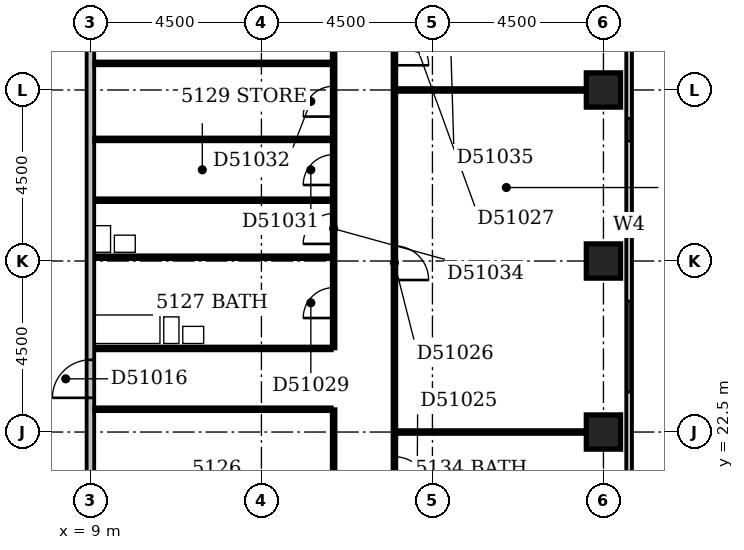
"""IFC4 building model, lengths in metres.
Left out: names, types, materials, properties, quantities, classifications, styles, units other than length and angle.
Written with IfcOpenShell. Run it as: python <this file> out.ifc"""

import sys

from ifc_helpers import new_model, si_unit, direction, frame, frame_2d, origin, origin_2d, place, context, subcontext, project, spatial, rectangle, extrude, element, fill, save


model = new_model("IFC4")
c1 = context("Model", 3, precision=1e-05, world=origin(), true_north=direction((0.0, 1.0)))
c2 = subcontext(c1, "Body", "Model", "MODEL_VIEW")
j1 = project(units=[si_unit("LENGTHUNIT", "METRE"), si_unit("PLANEANGLEUNIT", "RADIAN")], contexts=[c1])
p1 = place(None, origin())
s1 = spatial("IfcSite", under=j1, at=p1, CompositionType="ELEMENT")
p2 = place(p1, origin())
s2 = spatial("IfcBuilding", under=s1, at=p2, CompositionType="ELEMENT")
p3 = place(p2, frame((0.0, 0.0, 200.6)))
s3 = spatial("IfcBuildingStorey", under=s2, at=p3, CompositionType="ELEMENT", Elevation=200.6)
for number, where, z_axis, x_axis in (
    (1, (22.5, 22.5, -0.3), (0.0, 0.0, 1.0), (1.0, 0.0, 0.0)),
    (2, (22.5, 27.0, -0.3), (0.0, 0.0, 1.0), (1.0, 0.0, 0.0)),
    (3, (22.5, 31.5, -0.3), (0.0, 0.0, 1.0), (1.0, 0.0, 0.0)),
):
    element("IfcColumn", number, at=place(p3, frame(where, z_axis=z_axis, x_axis=x_axis)), inside=s3, PredefinedType="COLUMN", context=c2, shape_type="SweptSolid", body=[
        extrude(rectangle(XDim=0.9, YDim=0.9, at=origin_2d()), origin(), (0.0, 0.0, 1.0), 3.6),
    ])
p4 = place(p3, frame((23.175, 17.4, 0.0), z_axis=(0.0, 0.0, 1.0), x_axis=(0.0, 1.0, 0.0)))
e4 = element("IfcWall", 4, at=p4, inside=s3, PredefinedType="STANDARD", context=c2, shape_type="SweptSolid", body=[
    extrude(rectangle(XDim=17.85, YDim=0.15, at=frame_2d((8.925, 0.0))), origin(), (0.0, 0.0, 1.0), 2.7),
])
p5 = place(p4, frame((1.65, 0.0, 0.6)))
e5 = element("IfcOpeningElement", 5, at=p5, cuts=e4, PredefinedType="OPENING", context=c2, shape_type="SweptSolid", body=[
    extrude(rectangle(XDim=2.4, YDim=1.8, at=frame_2d((1.2, 0.9))), frame((0.0, 0.087, 0.0), z_axis=(0.0, -1.0, 0.0), x_axis=(1.0, 0.0, 0.0)), (0.0, 0.0, 1.0), 0.174),
])
p6 = place(p4, frame((6.15, 0.0, 0.6)))
e6 = element("IfcOpeningElement", 6, at=p6, cuts=e4, PredefinedType="OPENING", context=c2, shape_type="SweptSolid", body=[
    extrude(rectangle(XDim=2.4, YDim=1.8, at=frame_2d((1.2, 0.9))), frame((0.0, 0.087, 0.0), z_axis=(0.0, -1.0, 0.0), x_axis=(1.0, 0.0, 0.0)), (0.0, 0.0, 1.0), 0.174),
])
p7 = place(p4, frame((10.252, 0.0, 0.6)))
e7 = element("IfcOpeningElement", 7, at=p7, cuts=e4, PredefinedType="OPENING", context=c2, shape_type="SweptSolid", body=[
    extrude(rectangle(XDim=0.6, YDim=1.8, at=frame_2d((0.3, 0.9))), frame((0.0, 0.087, 0.0), z_axis=(0.0, -1.0, 0.0), x_axis=(1.0, 0.0, 0.0)), (0.0, 0.0, 1.0), 0.174),
])
p8 = place(p4, frame((12.756, 0.0, 0.6)))
e8 = element("IfcOpeningElement", 8, at=p8, cuts=e4, PredefinedType="OPENING", context=c2, shape_type="SweptSolid", body=[
    extrude(rectangle(XDim=0.6, YDim=1.8, at=frame_2d((0.3, 0.9))), frame((0.0, 0.087, 0.0), z_axis=(0.0, -1.0, 0.0), x_axis=(1.0, 0.0, 0.0)), (0.0, 0.0, 1.0), 0.174),
])
p9 = place(p4, frame((15.15, 0.0, 0.6)))
e9 = element("IfcOpeningElement", 9, at=p9, cuts=e4, PredefinedType="OPENING", context=c2, shape_type="SweptSolid", body=[
    extrude(rectangle(XDim=2.4, YDim=1.8, at=frame_2d((1.2, 0.9))), frame((0.0, 0.087, 0.0), z_axis=(0.0, -1.0, 0.0), x_axis=(1.0, 0.0, 0.0)), (0.0, 0.0, 1.0), 0.174),
])
p10 = place(p3, frame((9.0, 5.0, 0.0), z_axis=(0.0, 0.0, 1.0), x_axis=(0.0, 1.0, 0.0)))
e10 = element("IfcWall", 10, at=p10, inside=s3, PredefinedType="PARTITIONING", context=c2, shape_type="SweptSolid", body=[
    extrude(rectangle(XDim=31.0, YDim=0.2, at=frame_2d((15.5, 0.0))), origin(), (0.0, 0.0, 1.0), 3.3),
])
p11 = place(p10, frame((18.4, 0.0, 0.0)))
e11 = element("IfcOpeningElement", 11, at=p11, cuts=e10, PredefinedType="OPENING", context=c2, shape_type="SweptSolid", body=[
    extrude(rectangle(XDim=1.0, YDim=2.1, at=frame_2d((0.5, 1.05))), frame((0.0, 0.112, 0.0), z_axis=(0.0, -1.0, 0.0), x_axis=(1.0, 0.0, 0.0)), (0.0, 0.0, 1.0), 0.224),
])
p12 = place(p10, frame((11.7, 0.0, 0.0)))
e12 = element("IfcOpeningElement", 12, at=p12, cuts=e10, PredefinedType="OPENING", context=c2, shape_type="SweptSolid", body=[
    extrude(rectangle(XDim=1.0, YDim=2.1, at=frame_2d((0.5, 1.05))), frame((0.0, 0.112, 0.0), z_axis=(0.0, -1.0, 0.0), x_axis=(1.0, 0.0, 0.0)), (0.0, 0.0, 1.0), 0.224),
])
p13 = place(p10, frame((1.5, 0.0, 0.0)))
e13 = element("IfcOpeningElement", 13, at=p13, cuts=e10, PredefinedType="OPENING", context=c2, shape_type="SweptSolid", body=[
    extrude(rectangle(XDim=0.9, YDim=2.1, at=frame_2d((0.45, 1.05))), frame((0.0, 0.112, 0.0), z_axis=(0.0, -1.0, 0.0), x_axis=(1.0, 0.0, 0.0)), (0.0, 0.0, 1.0), 0.224),
])
p14 = place(p3, frame((15.4, 18.1, 0.0), z_axis=(0.0, 0.0, 1.0), x_axis=(0.0, 1.0, 0.0)))
e14 = element("IfcWall", 14, at=p14, inside=s3, PredefinedType="PARTITIONING", context=c2, shape_type="SweptSolid", body=[
    extrude(rectangle(XDim=5.0, YDim=0.1, at=frame_2d((2.5, 0.0))), origin(), (0.0, 0.0, 1.0), 3.3),
])
p15 = place(p14, frame((2.0, 0.0, 0.0)))
e15 = element("IfcOpeningElement", 15, at=p15, cuts=e14, PredefinedType="OPENING", context=c2, shape_type="SweptSolid", body=[
    extrude(rectangle(XDim=0.9, YDim=2.1, at=frame_2d((0.45, 1.05))), frame((0.0, 0.062, 0.0), z_axis=(0.0, -1.0, 0.0), x_axis=(1.0, 0.0, 0.0)), (0.0, 0.0, 1.0), 0.124),
])
p16 = place(p3, frame((17.0, 18.1, 0.0), z_axis=(0.0, 0.0, 1.0), x_axis=(0.0, 1.0, 0.0)))
e16 = element("IfcWall", 16, at=p16, inside=s3, PredefinedType="PARTITIONING", context=c2, shape_type="SweptSolid", body=[
    extrude(rectangle(XDim=17.8, YDim=0.1, at=frame_2d((8.9, 0.0))), origin(), (0.0, 0.0, 1.0), 3.3),
])
p17 = place(p16, frame((2.85, 0.0, 0.0)))
e17 = element("IfcOpeningElement", 17, at=p17, cuts=e16, PredefinedType="OPENING", context=c2, shape_type="SweptSolid", body=[
    extrude(rectangle(XDim=0.9, YDim=2.1, at=frame_2d((0.45, 1.05))), frame((0.0, 0.062, 0.0), z_axis=(0.0, -1.0, 0.0), x_axis=(1.0, 0.0, 0.0)), (0.0, 0.0, 1.0), 0.124),
])
p18 = place(p16, frame((8.4, 0.0, 0.0)))
e18 = element("IfcOpeningElement", 18, at=p18, cuts=e16, PredefinedType="OPENING", context=c2, shape_type="SweptSolid", body=[
    extrude(rectangle(XDim=0.9, YDim=2.1, at=frame_2d((0.45, 1.05))), frame((0.0, 0.062, 0.0), z_axis=(0.0, -1.0, 0.0), x_axis=(1.0, 0.0, 0.0)), (0.0, 0.0, 1.0), 0.124),
])
p19 = place(p16, frame((14.05, 0.0, 0.0)))
e19 = element("IfcOpeningElement", 19, at=p19, cuts=e16, PredefinedType="OPENING", context=c2, shape_type="SweptSolid", body=[
    extrude(rectangle(XDim=0.9, YDim=2.1, at=frame_2d((0.45, 1.05))), frame((0.0, 0.062, 0.0), z_axis=(0.0, -1.0, 0.0), x_axis=(1.0, 0.0, 0.0)), (0.0, 0.0, 1.0), 0.124),
])
p20 = place(p3, frame((17.05, 22.5, 0.0), z_axis=(0.0, 0.0, 1.0), x_axis=(1.0, 0.0, 0.0)))
e20 = element("IfcWall", 20, at=p20, inside=s3, PredefinedType="PARTITIONING", context=c2, shape_type="SweptSolid", body=[
    extrude(rectangle(XDim=5.0, YDim=0.1, at=frame_2d((2.5, 0.0))), origin(), (0.0, 0.0, 1.0), 3.3),
])
p21 = place(p3, frame((9.1, 23.1, 0.0), z_axis=(0.0, 0.0, 1.0), x_axis=(1.0, 0.0, 0.0)))
e21 = element("IfcWall", 21, at=p21, inside=s3, PredefinedType="PARTITIONING", context=c2, shape_type="SweptSolid", body=[
    extrude(rectangle(XDim=6.25, YDim=0.1, at=frame_2d((3.125, 0.0))), origin(), (0.0, 0.0, 1.0), 3.3),
])
p22 = place(p3, frame((9.1, 24.7, 0.0), z_axis=(0.0, 0.0, 1.0), x_axis=(1.0, 0.0, 0.0)))
e22 = element("IfcWall", 22, at=p22, inside=s3, PredefinedType="PLUMBINGWALL", context=c2, shape_type="SweptSolid", body=[
    extrude(rectangle(XDim=6.25, YDim=0.1, at=frame_2d((3.125, 0.0))), origin(), (0.0, 0.0, 1.0), 3.3),
])
p23 = place(p3, frame((15.4, 24.7, 0.0), z_axis=(0.0, 0.0, 1.0), x_axis=(0.0, 1.0, 0.0)))
e23 = element("IfcWall", 23, at=p23, inside=s3, PredefinedType="PARTITIONING", context=c2, shape_type="SweptSolid", body=[
    extrude(rectangle(XDim=11.2, YDim=0.1, at=frame_2d((5.6, 0.0))), origin(), (0.0, 0.0, 1.0), 3.3),
])
p24 = place(p23, frame((0.8, 0.0, 0.0)))
e24 = element("IfcOpeningElement", 24, at=p24, cuts=e23, PredefinedType="OPENING", context=c2, shape_type="SweptSolid", body=[
    extrude(rectangle(XDim=0.8, YDim=2.1, at=frame_2d((0.4, 1.05))), frame((0.0, 0.062, 0.0), z_axis=(0.0, -1.0, 0.0), x_axis=(1.0, 0.0, 0.0)), (0.0, 0.0, 1.0), 0.124),
])
p25 = place(p23, frame((8.1, 0.0, 0.0)))
e25 = element("IfcOpeningElement", 25, at=p25, cuts=e23, PredefinedType="OPENING", context=c2, shape_type="SweptSolid", body=[
    extrude(rectangle(XDim=0.8, YDim=2.1, at=frame_2d((0.4, 1.05))), frame((0.0, 0.062, 0.0), z_axis=(0.0, -1.0, 0.0), x_axis=(1.0, 0.0, 0.0)), (0.0, 0.0, 1.0), 0.124),
])
p26 = place(p23, frame((4.3, 0.0, 0.0)))
e26 = element("IfcOpeningElement", 26, at=p26, cuts=e23, PredefinedType="OPENING", context=c2, shape_type="SweptSolid", body=[
    extrude(rectangle(XDim=0.8, YDim=2.1, at=frame_2d((0.4, 1.05))), frame((0.0, 0.062, 0.0), z_axis=(0.0, -1.0, 0.0), x_axis=(1.0, 0.0, 0.0)), (0.0, 0.0, 1.0), 0.124),
])
p27 = place(p23, frame((6.1, 0.0, 0.0)))
e27 = element("IfcOpeningElement", 27, at=p27, cuts=e23, PredefinedType="OPENING", context=c2, shape_type="SweptSolid", body=[
    extrude(rectangle(XDim=0.8, YDim=2.1, at=frame_2d((0.4, 1.05))), frame((0.0, 0.062, 0.0), z_axis=(0.0, -1.0, 0.0), x_axis=(1.0, 0.0, 0.0)), (0.0, 0.0, 1.0), 0.124),
])
p28 = place(p23, frame((10.0, 0.0, 0.0)))
e28 = element("IfcOpeningElement", 28, at=p28, cuts=e23, PredefinedType="OPENING", context=c2, shape_type="SweptSolid", body=[
    extrude(rectangle(XDim=0.8, YDim=2.1, at=frame_2d((0.4, 1.05))), frame((0.0, 0.062, 0.0), z_axis=(0.0, -1.0, 0.0), x_axis=(1.0, 0.0, 0.0)), (0.0, 0.0, 1.0), 0.124),
])
p29 = place(p23, frame((2.75, 0.0, 0.0)))
e29 = element("IfcOpeningElement", 29, at=p29, cuts=e23, PredefinedType="OPENING", context=c2, shape_type="SweptSolid", body=[
    extrude(rectangle(XDim=0.8, YDim=2.1, at=frame_2d((0.4, 1.05))), frame((0.0, 0.062, 0.0), z_axis=(0.0, -1.0, 0.0), x_axis=(1.0, 0.0, 0.0)), (0.0, 0.0, 1.0), 0.124),
])
p30 = place(p3, frame((9.1, 27.1, 0.0), z_axis=(0.0, 0.0, 1.0), x_axis=(1.0, 0.0, 0.0)))
e30 = element("IfcWall", 30, at=p30, inside=s3, PredefinedType="PLUMBINGWALL", context=c2, shape_type="SweptSolid", body=[
    extrude(rectangle(XDim=6.25, YDim=0.1, at=frame_2d((3.125, 0.0))), origin(), (0.0, 0.0, 1.0), 2.7),
])
p31 = place(p3, frame((9.1, 28.6, 0.0), z_axis=(0.0, 0.0, 1.0), x_axis=(1.0, 0.0, 0.0)))
e31 = element("IfcWall", 31, at=p31, inside=s3, PredefinedType="PLUMBINGWALL", context=c2, shape_type="SweptSolid", body=[
    extrude(rectangle(XDim=6.25, YDim=0.1, at=frame_2d((3.125, 0.0))), origin(), (0.0, 0.0, 1.0), 3.3),
])
p32 = place(p3, frame((9.1, 30.2, 0.0), z_axis=(0.0, 0.0, 1.0), x_axis=(1.0, 0.0, 0.0)))
e32 = element("IfcWall", 32, at=p32, inside=s3, PredefinedType="PARTITIONING", context=c2, shape_type="SweptSolid", body=[
    extrude(rectangle(XDim=6.25, YDim=0.1, at=frame_2d((3.125, 0.0))), origin(), (0.0, 0.0, 1.0), 3.3),
])
p33 = place(p3, frame((17.05, 31.5, 0.0), z_axis=(0.0, 0.0, 1.0), x_axis=(1.0, 0.0, 0.0)))
e33 = element("IfcWall", 33, at=p33, inside=s3, PredefinedType="PARTITIONING", context=c2, shape_type="SweptSolid", body=[
    extrude(rectangle(XDim=5.0, YDim=0.1, at=frame_2d((2.5, 0.0))), origin(), (0.0, 0.0, 1.0), 3.3),
])
p34 = place(p3, frame((9.1, 32.2, 0.0), z_axis=(0.0, 0.0, 1.0), x_axis=(1.0, 0.0, 0.0)))
e34 = element("IfcWall", 34, at=p34, inside=s3, PredefinedType="PARTITIONING", context=c2, shape_type="SweptSolid", body=[
    extrude(rectangle(XDim=6.25, YDim=0.1, at=frame_2d((3.125, 0.0))), origin(), (0.0, 0.0, 1.0), 3.3),
])
p35 = place(p6, origin())
e35 = element("IfcWindow", 35, at=p35, inside=s3, PartitioningType="SINGLE_PANEL", PredefinedType="WINDOW", context=c2, shape_type="SweptSolid", body=[
    extrude(rectangle(XDim=2.4, YDim=1.8, at=frame_2d((1.2, 0.9))), frame((0.0, 0.03, 0.0), z_axis=(0.0, -1.0, 0.0), x_axis=(1.0, 0.0, 0.0)), (0.0, 0.0, 1.0), 0.06),
])
fill(e6, e35)
p36 = place(p7, origin())
e36 = element("IfcWindow", 36, at=p36, inside=s3, PartitioningType="SINGLE_PANEL", PredefinedType="WINDOW", context=c2, shape_type="SweptSolid", body=[
    extrude(rectangle(XDim=0.6, YDim=1.8, at=frame_2d((0.3, 0.9))), frame((0.0, 0.03, 0.0), z_axis=(0.0, -1.0, 0.0), x_axis=(1.0, 0.0, 0.0)), (0.0, 0.0, 1.0), 0.06),
])
fill(e7, e36)
p37 = place(p8, origin())
e37 = element("IfcWindow", 37, at=p37, inside=s3, PartitioningType="SINGLE_PANEL", PredefinedType="WINDOW", context=c2, shape_type="SweptSolid", body=[
    extrude(rectangle(XDim=0.6, YDim=1.8, at=frame_2d((0.3, 0.9))), frame((0.0, 0.03, 0.0), z_axis=(0.0, -1.0, 0.0), x_axis=(1.0, 0.0, 0.0)), (0.0, 0.0, 1.0), 0.06),
])
fill(e8, e37)
p38 = place(p11, origin())
e38 = element("IfcDoor", 38, at=p38, inside=s3, OperationType="SINGLE_SWING_LEFT", PredefinedType="DOOR", context=c2, shape_type="SweptSolid", body=[
    extrude(rectangle(XDim=1.0, YDim=2.1, at=frame_2d((0.5, 1.05))), frame((0.0, 0.025, 0.0), z_axis=(0.0, -1.0, 0.0), x_axis=(1.0, 0.0, 0.0)), (0.0, 0.0, 1.0), 0.05),
])
fill(e11, e38)
p39 = place(p17, frame((0.9, 0.0, 0.0), z_axis=(0.0, 0.0, 1.0), x_axis=(-1.0, 0.0, 0.0)))
e39 = element("IfcDoor", 39, at=p39, inside=s3, OperationType="SINGLE_SWING_RIGHT", PredefinedType="DOOR", context=c2, shape_type="SweptSolid", body=[
    extrude(rectangle(XDim=0.9, YDim=2.1, at=frame_2d((0.45, 1.05))), frame((0.0, 0.025, 0.0), z_axis=(0.0, -1.0, 0.0), x_axis=(1.0, 0.0, 0.0)), (0.0, 0.0, 1.0), 0.05),
])
fill(e17, e39)
p40 = place(p18, frame((0.9, 0.0, 0.0), z_axis=(0.0, 0.0, 1.0), x_axis=(-1.0, 0.0, 0.0)))
e40 = element("IfcDoor", 40, at=p40, inside=s3, OperationType="SINGLE_SWING_RIGHT", PredefinedType="DOOR", context=c2, shape_type="SweptSolid", body=[
    extrude(rectangle(XDim=0.9, YDim=2.1, at=frame_2d((0.45, 1.05))), frame((0.0, 0.025, 0.0), z_axis=(0.0, -1.0, 0.0), x_axis=(1.0, 0.0, 0.0)), (0.0, 0.0, 1.0), 0.05),
])
fill(e18, e40)
p41 = place(p19, frame((0.9, 0.0, 0.0), z_axis=(0.0, 0.0, 1.0), x_axis=(-1.0, 0.0, 0.0)))
e41 = element("IfcDoor", 41, at=p41, inside=s3, OperationType="SINGLE_SWING_RIGHT", PredefinedType="DOOR", context=c2, shape_type="SweptSolid", body=[
    extrude(rectangle(XDim=0.9, YDim=2.1, at=frame_2d((0.45, 1.05))), frame((0.0, 0.025, 0.0), z_axis=(0.0, -1.0, 0.0), x_axis=(1.0, 0.0, 0.0)), (0.0, 0.0, 1.0), 0.05),
])
fill(e19, e41)
p42 = place(p24, origin())
e42 = element("IfcDoor", 42, at=p42, inside=s3, OperationType="SINGLE_SWING_LEFT", PredefinedType="DOOR", context=c2, shape_type="SweptSolid", body=[
    extrude(rectangle(XDim=0.8, YDim=2.1, at=frame_2d((0.4, 1.05))), frame((0.0, 0.025, 0.0), z_axis=(0.0, -1.0, 0.0), x_axis=(1.0, 0.0, 0.0)), (0.0, 0.0, 1.0), 0.05),
])
fill(e24, e42)
p43 = place(p26, origin())
e43 = element("IfcDoor", 43, at=p43, inside=s3, OperationType="SINGLE_SWING_LEFT", PredefinedType="DOOR", context=c2, shape_type="SweptSolid", body=[
    extrude(rectangle(XDim=0.8, YDim=2.1, at=frame_2d((0.4, 1.05))), frame((0.0, 0.025, 0.0), z_axis=(0.0, -1.0, 0.0), x_axis=(1.0, 0.0, 0.0)), (0.0, 0.0, 1.0), 0.05),
])
fill(e26, e43)
p44 = place(p27, origin())
e44 = element("IfcDoor", 44, at=p44, inside=s3, OperationType="SINGLE_SWING_LEFT", PredefinedType="DOOR", context=c2, shape_type="SweptSolid", body=[
    extrude(rectangle(XDim=0.8, YDim=2.1, at=frame_2d((0.4, 1.05))), frame((0.0, 0.025, 0.0), z_axis=(0.0, -1.0, 0.0), x_axis=(1.0, 0.0, 0.0)), (0.0, 0.0, 1.0), 0.05),
])
fill(e27, e44)
p45 = place(p29, origin())
e45 = element("IfcDoor", 45, at=p45, inside=s3, OperationType="SINGLE_SWING_LEFT", PredefinedType="DOOR", context=c2, shape_type="SweptSolid", body=[
    extrude(rectangle(XDim=0.8, YDim=2.1, at=frame_2d((0.4, 1.05))), frame((0.0, 0.025, 0.0), z_axis=(0.0, -1.0, 0.0), x_axis=(1.0, 0.0, 0.0)), (0.0, 0.0, 1.0), 0.05),
])
fill(e29, e45)
save(model, sys.argv[1])
